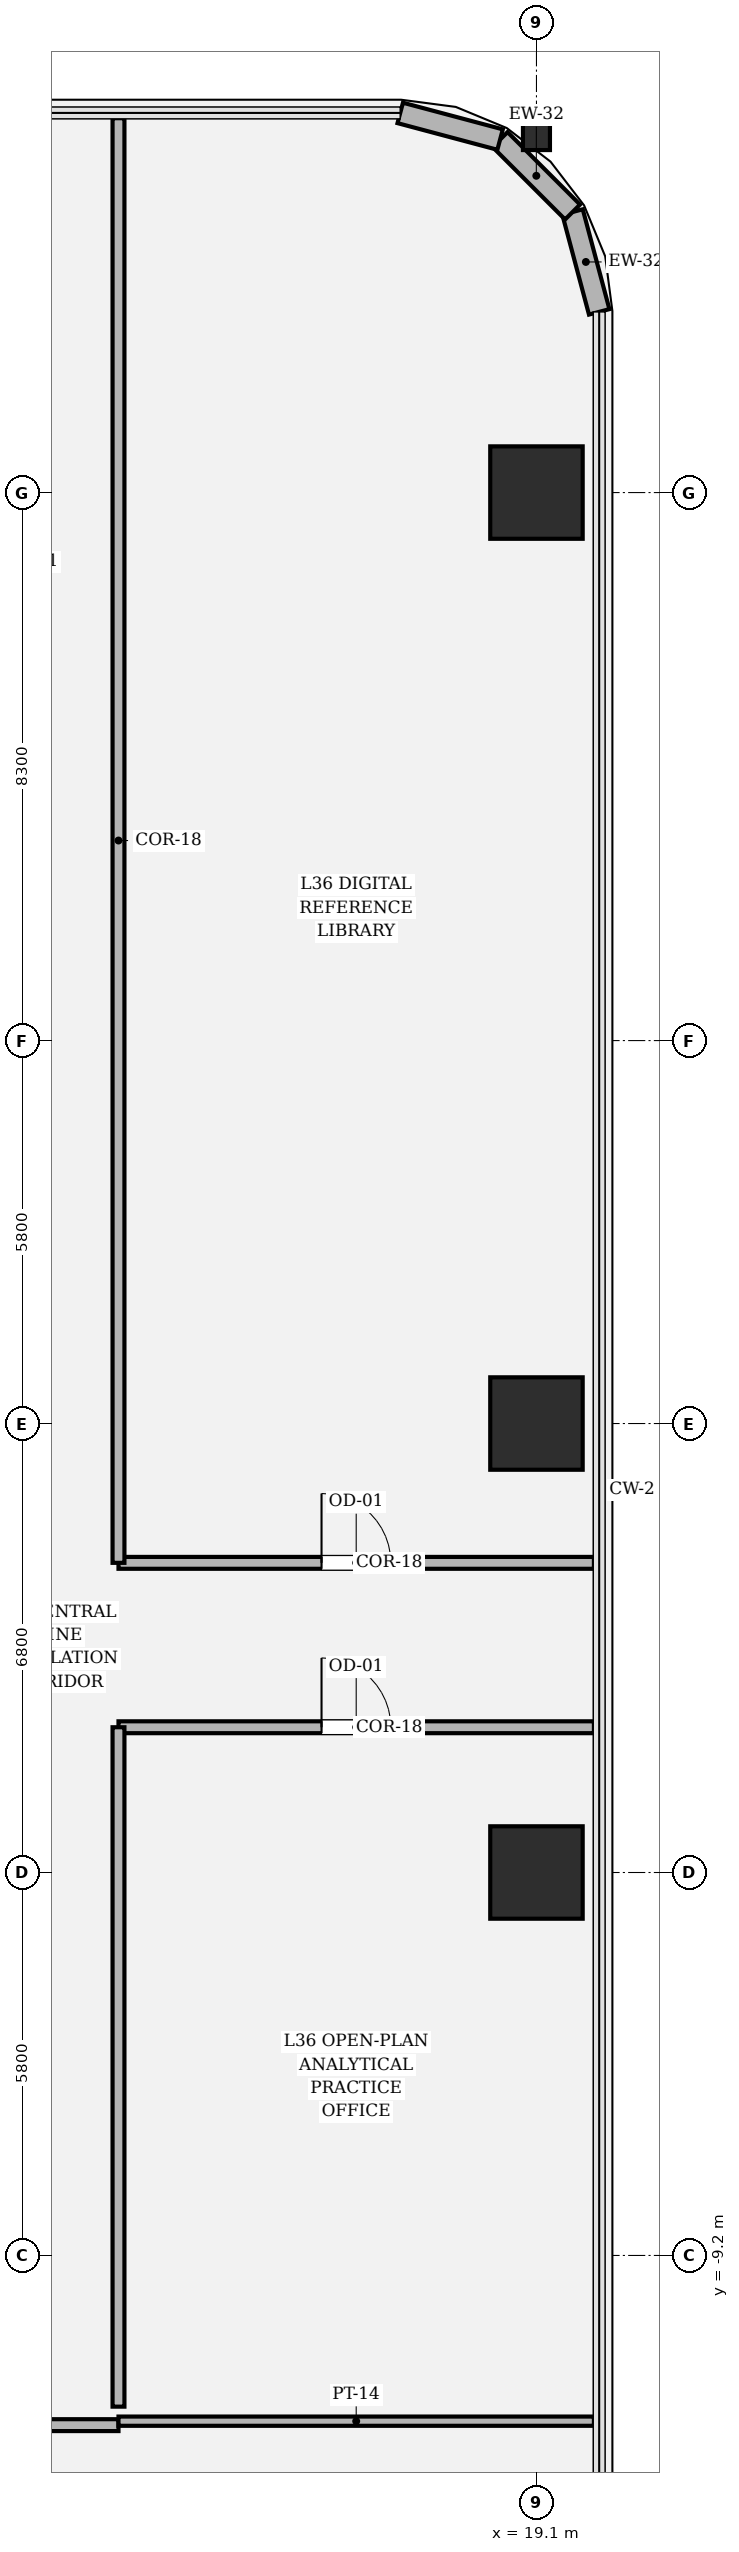
"""IFC4 building model, lengths in metres.
Left out: names, types, materials, properties, quantities, classifications, styles, units other than length and angle.
Written with IfcOpenShell. Run it as: python <this file> out.ifc"""

import sys

from ifc_helpers import new_model, si_unit, direction, frame, frame_2d, origin, origin_2d, place, context, subcontext, project, spatial, rectangle, hollow_rectangle, i_section, extrude, element, fill, save


model = new_model("IFC4")
c1 = context("Model", 3, precision=1e-05, world=origin(), true_north=direction((0.0, 1.0)))
c2 = subcontext(c1, "Body", "Model", "MODEL_VIEW")
j1 = project(units=[si_unit("LENGTHUNIT", "METRE"), si_unit("PLANEANGLEUNIT", "RADIAN")], contexts=[c1])
p1 = place(None, origin())
s1 = spatial("IfcSite", under=j1, at=p1, CompositionType="ELEMENT")
p2 = place(p1, origin())
s2 = spatial("IfcBuilding", under=s1, at=p2, CompositionType="ELEMENT")
p3 = place(p2, frame((0.0, 0.0, 156.0)))
s3 = spatial("IfcBuildingStorey", under=s2, at=p3, CompositionType="ELEMENT", Elevation=156.0)
for number, where, z_axis, x_axis in (
    (1, (19.1, -3.4, 0.0), (0.0, 0.0, 1.0), (1.0, 0.0, 0.0)),
    (2, (19.1, 3.4, 0.0), (0.0, 0.0, 1.0), (1.0, 0.0, 0.0)),
    (3, (19.1, 17.5, 0.0), (0.0, 0.0, 1.0), (1.0, 0.0, 0.0)),
):
    element("IfcColumn", number, at=place(p3, frame(where, z_axis=z_axis, x_axis=x_axis)), inside=s3, PredefinedType="COLUMN", context=c2, shape_type="SweptSolid", body=[
        extrude(hollow_rectangle(XDim=1.4, YDim=1.4, WallThickness=0.042, at=origin_2d()), origin(), (0.0, 0.0, 1.0), 4.05),
    ])
p4 = place(p3, frame((19.1, 22.9, 0.0), z_axis=(0.0, 0.0, 1.0), x_axis=(1.0, 0.0, 0.0)))
e4 = element("IfcColumn", 4, at=p4, inside=s3, PredefinedType="COLUMN", context=c2, shape_type="SweptSolid", body=[
    extrude(i_section(OverallWidth=0.409, OverallDepth=0.425, WebThickness=0.032, FlangeThickness=0.052, FilletRadius=0.018, at=origin_2d()), origin(), (0.0, 0.0, 1.0), 4.048),
])
p5 = place(p3, frame((20.05, 20.237, 0.0), z_axis=(0.0, 0.0, 1.0), x_axis=(-0.257847112249, 0.966185730957, 0.0)))
e5 = element("IfcWall", 5, at=p5, inside=s3, PredefinedType="SOLIDWALL", context=c2, shape_type="SweptSolid", body=[
    extrude(rectangle(XDim=1.565, YDim=0.32, at=frame_2d((0.783, 0.0))), origin(), (0.0, 0.0, 1.0), 3.83),
])
p6 = place(p3, frame((19.646, 21.749, 0.0), z_axis=(0.0, 0.0, 1.0), x_axis=(-0.707028130747, 0.707185422879, 0.0)))
e6 = element("IfcWall", 6, at=p6, inside=s3, PredefinedType="SOLIDWALL", context=c2, shape_type="SweptSolid", body=[
    extrude(rectangle(XDim=1.552, YDim=0.32, at=frame_2d((0.776, 0.0))), origin(), (0.0, 0.0, 1.0), 2.504),
])
p7 = place(p3, frame((18.549, 22.847, 0.0), z_axis=(0.0, 0.0, 1.0), x_axis=(-0.966224582397, 0.257701486942, 0.0)))
e7 = element("IfcWall", 7, at=p7, inside=s3, PredefinedType="SOLIDWALL", context=c2, shape_type="SweptSolid", body=[
    extrude(rectangle(XDim=1.565, YDim=0.32, at=frame_2d((0.783, 0.0))), origin(), (0.0, 0.0, 1.0), 2.544),
])
p8 = place(p3, frame((-12.77, -11.77, 0.0), z_axis=(0.0, 0.0, 1.0), x_axis=(1.0, 0.0, 0.0)))
e8 = element("IfcWall", 8, at=p8, inside=s3, PredefinedType="PARTITIONING", context=c2, shape_type="SweptSolid", body=[
    extrude(rectangle(XDim=25.54, YDim=0.18, at=frame_2d((12.77, 0.0))), origin(), (0.0, 0.0, 1.0), 3.174),
])
p9 = place(p8, frame((12.245, 0.0, 0.0)))
e9 = element("IfcOpeningElement", 9, at=p9, cuts=e8, PredefinedType="OPENING", context=c2, shape_type="SweptSolid", body=[
    extrude(rectangle(XDim=1.05, YDim=2.2, at=frame_2d((0.525, 1.1))), frame((0.0, 0.1, 0.0), z_axis=(0.0, -1.0, 0.0), x_axis=(1.0, 0.0, 0.0)), (0.0, 0.0, 1.0), 0.2),
])
p10 = place(p3, frame((12.77, -11.71, 0.0), z_axis=(0.0, 0.0, 1.0), x_axis=(1.0, 0.0, 0.0)))
e10 = element("IfcWall", 10, at=p10, inside=s3, PredefinedType="PARTITIONING", context=c2, shape_type="SweptSolid", body=[
    extrude(rectangle(XDim=7.2, YDim=0.14, at=frame_2d((3.6, 0.0))), origin(), (0.0, 0.0, 1.0), 3.174),
])
p11 = place(p3, frame((12.77, -1.2, 0.0), z_axis=(0.0, 0.0, 1.0), x_axis=(1.0, 0.0, 0.0)))
e11 = element("IfcWall", 11, at=p11, inside=s3, PredefinedType="PARTITIONING", context=c2, shape_type="SweptSolid", body=[
    extrude(rectangle(XDim=7.2, YDim=0.18, at=frame_2d((3.6, 0.0))), origin(), (0.0, 0.0, 1.0), 3.174),
])
p12 = place(p11, frame((3.075, 0.0, 0.0)))
e12 = element("IfcOpeningElement", 12, at=p12, cuts=e11, PredefinedType="OPENING", context=c2, shape_type="SweptSolid", body=[
    extrude(rectangle(XDim=1.05, YDim=2.2, at=frame_2d((0.525, 1.1))), frame((0.0, 0.1, 0.0), z_axis=(0.0, -1.0, 0.0), x_axis=(1.0, 0.0, 0.0)), (0.0, 0.0, 1.0), 0.2),
])
p13 = place(p3, frame((12.77, -11.49, 0.0), z_axis=(0.0, 0.0, 1.0), x_axis=(0.0, 1.0, 0.0)))
e13 = element("IfcWall", 13, at=p13, inside=s3, PredefinedType="PARTITIONING", context=c2, shape_type="SweptSolid", body=[
    extrude(rectangle(XDim=10.29, YDim=0.18, at=frame_2d((5.145, 0.0))), origin(), (0.0, 0.0, 1.0), 3.174),
])
p14 = place(p3, frame((19.97, 1.29, 0.0), z_axis=(0.0, 0.0, 1.0), x_axis=(-1.0, 0.0, 0.0)))
e14 = element("IfcWall", 14, at=p14, inside=s3, PredefinedType="PARTITIONING", context=c2, shape_type="SweptSolid", body=[
    extrude(rectangle(XDim=7.2, YDim=0.18, at=frame_2d((3.6, 0.0))), origin(), (0.0, 0.0, 1.0), 3.174),
])
p15 = place(p14, frame((3.075, 0.0, 0.0)))
e15 = element("IfcOpeningElement", 15, at=p15, cuts=e14, PredefinedType="OPENING", context=c2, shape_type="SweptSolid", body=[
    extrude(rectangle(XDim=1.05, YDim=2.2, at=frame_2d((0.525, 1.1))), frame((0.0, 0.1, 0.0), z_axis=(0.0, -1.0, 0.0), x_axis=(1.0, 0.0, 0.0)), (0.0, 0.0, 1.0), 0.2),
])
p16 = place(p3, frame((12.77, 1.29, 0.0), z_axis=(0.0, 0.0, 1.0), x_axis=(0.0, 1.0, 0.0)))
e16 = element("IfcWall", 16, at=p16, inside=s3, PredefinedType="PARTITIONING", context=c2, shape_type="SweptSolid", body=[
    extrude(rectangle(XDim=21.88, YDim=0.18, at=frame_2d((10.94, 0.0))), origin(), (0.0, 0.0, 1.0), 2.544),
])
p17 = place(p12, origin())
e17 = element("IfcDoor", 17, at=p17, inside=s3, OperationType="SINGLE_SWING_LEFT", PredefinedType="DOOR", context=c2, shape_type="SweptSolid", body=[
    extrude(rectangle(XDim=1.05, YDim=2.2, at=frame_2d((0.525, 1.1))), frame((0.0, 0.025, 0.0), z_axis=(0.0, -1.0, 0.0), x_axis=(1.0, 0.0, 0.0)), (0.0, 0.0, 1.0), 0.05),
])
fill(e12, e17)
p18 = place(p15, origin())
e18 = element("IfcDoor", 18, at=p18, inside=s3, OperationType="SINGLE_SWING_RIGHT", PredefinedType="DOOR", context=c2, shape_type="SweptSolid", body=[
    extrude(rectangle(XDim=1.05, YDim=2.2, at=frame_2d((0.525, 1.1))), frame((0.0, 0.025, 0.0), z_axis=(0.0, -1.0, 0.0), x_axis=(1.0, 0.0, 0.0)), (0.0, 0.0, 1.0), 0.05),
])
fill(e15, e18)
save(model, sys.argv[1])
